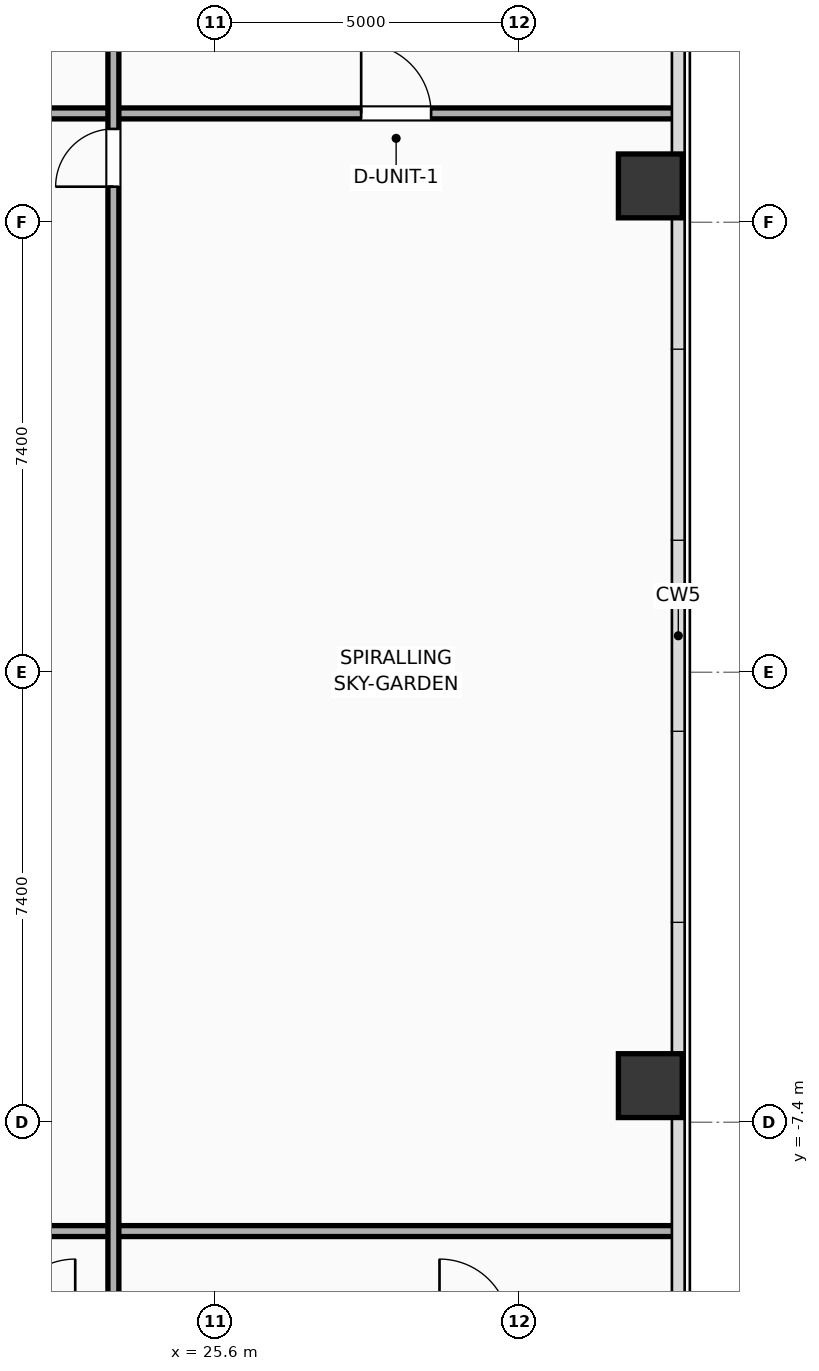
"""IFC4 building model, lengths in metres.
Left out: names, types, materials, properties, quantities, classifications, styles, units other than length and angle.
Written with IfcOpenShell. Run it as: python <this file> out.ifc"""

import sys

from ifc_helpers import new_model, si_unit, direction, frame, frame_2d, origin, origin_2d, place, context, subcontext, project, spatial, rectangle, hollow_rectangle, extrude, element, fill, save


model = new_model("IFC4")
c1 = context("Model", 3, precision=1e-05, world=origin(), true_north=direction((0.0, 1.0)))
c2 = subcontext(c1, "Body", "Model", "MODEL_VIEW")
j1 = project(units=[si_unit("LENGTHUNIT", "METRE"), si_unit("PLANEANGLEUNIT", "RADIAN")], contexts=[c1])
p1 = place(None, origin())
s1 = spatial("IfcSite", under=j1, at=p1, CompositionType="ELEMENT")
p2 = place(p1, origin())
s2 = spatial("IfcBuilding", under=s1, at=p2, CompositionType="ELEMENT")
p3 = place(p2, frame((0.0, 0.0, 85.8)))
s3 = spatial("IfcBuildingStorey", under=s2, at=p3, CompositionType="ELEMENT", Elevation=85.8)
for number, where, z_axis, x_axis in (
    (1, (32.75, -6.798, -0.4), (0.0, 0.0, 1.0), (1.0, 0.0, 0.0)),
    (2, (32.75, 7.998, -0.4), (0.0, 0.0, 1.0), (1.0, 0.0, 0.0)),
):
    element("IfcColumn", number, at=place(p3, frame(where, z_axis=z_axis, x_axis=x_axis)), inside=s3, PredefinedType="COLUMN", context=c2, shape_type="SweptSolid", body=[
        extrude(hollow_rectangle(XDim=1.05, YDim=1.05, WallThickness=0.036, at=origin_2d()), origin(), (0.0, 0.0, 1.0), 4.3),
    ])
p4 = place(p3, frame((9.88, 9.19, 0.0), z_axis=(0.0, 0.0, 1.0), x_axis=(1.0, 0.0, 0.0)))
e3 = element("IfcWall", 3, at=p4, inside=s3, PredefinedType="PARTITIONING", context=c2, shape_type="SweptSolid", body=[
    extrude(rectangle(XDim=23.33, YDim=0.18, at=frame_2d((11.665, 0.0))), origin(), (0.0, 0.0, 1.0), 3.65),
])
p5 = place(p4, frame((18.115, 0.0, 0.0)))
e4 = element("IfcOpeningElement", 4, at=p5, cuts=e3, PredefinedType="OPENING", context=c2, shape_type="SweptSolid", body=[
    extrude(rectangle(XDim=1.15, YDim=2.05, at=frame_2d((0.575, 1.025))), frame((0.0, 0.1, 0.0), z_axis=(0.0, -1.0, 0.0), x_axis=(1.0, 0.0, 0.0)), (0.0, 0.0, 1.0), 0.2),
])
p6 = place(p3, frame((9.88, -9.19, 0.0), z_axis=(0.0, 0.0, 1.0), x_axis=(1.0, 0.0, 0.0)))
e5 = element("IfcWall", 5, at=p6, inside=s3, PredefinedType="PARTITIONING", context=c2, shape_type="SweptSolid", body=[
    extrude(rectangle(XDim=23.33, YDim=0.18, at=frame_2d((11.665, 0.0))), origin(), (0.0, 0.0, 1.0), 3.65),
])
p7 = place(p3, frame((23.92, -10.85, 0.0), z_axis=(0.0, 0.0, 1.0), x_axis=(0.0, 1.0, 0.0)))
e6 = element("IfcWall", 6, at=p7, inside=s3, PredefinedType="PARTITIONING", context=c2, shape_type="SweptSolid", body=[
    extrude(rectangle(XDim=21.7, YDim=0.18, at=frame_2d((10.85, 0.0))), origin(), (0.0, 0.0, 1.0), 3.65),
])
p8 = place(p7, frame((18.835, 0.0, 0.0)))
e7 = element("IfcOpeningElement", 7, at=p8, cuts=e6, PredefinedType="OPENING", context=c2, shape_type="SweptSolid", body=[
    extrude(rectangle(XDim=0.95, YDim=2.05, at=frame_2d((0.475, 1.025))), frame((0.0, 0.1, 0.0), z_axis=(0.0, -1.0, 0.0), x_axis=(1.0, 0.0, 0.0)), (0.0, 0.0, 1.0), 0.2),
])
p9 = place(p5, origin())
e8 = element("IfcDoor", 8, at=p9, inside=s3, OperationType="SINGLE_SWING_LEFT", PredefinedType="DOOR", context=c2, shape_type="SweptSolid", body=[
    extrude(rectangle(XDim=1.15, YDim=2.05, at=frame_2d((0.575, 1.025))), frame((0.0, 0.025, 0.0), z_axis=(0.0, -1.0, 0.0), x_axis=(1.0, 0.0, 0.0)), (0.0, 0.0, 1.0), 0.05),
])
fill(e4, e8)
p10 = place(p8, origin())
e9 = element("IfcDoor", 9, at=p10, inside=s3, OperationType="SINGLE_SWING_LEFT", PredefinedType="DOOR", context=c2, shape_type="SweptSolid", body=[
    extrude(rectangle(XDim=0.95, YDim=2.05, at=frame_2d((0.475, 1.025))), frame((0.0, 0.025, 0.0), z_axis=(0.0, -1.0, 0.0), x_axis=(1.0, 0.0, 0.0)), (0.0, 0.0, 1.0), 0.05),
])
fill(e7, e9)
save(model, sys.argv[1])
